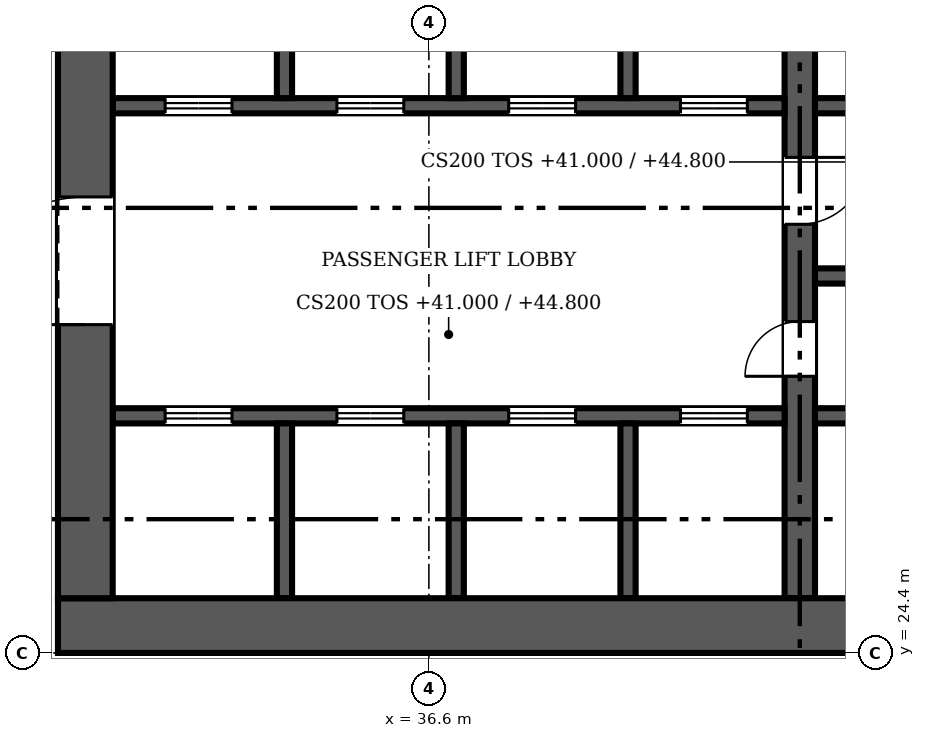
"""IFC4 building model, lengths in metres.
Left out: names, types, materials, properties, quantities, classifications, styles, units other than length and angle.
Written with IfcOpenShell. Run it as: python <this file> out.ifc"""

import sys

from ifc_helpers import new_model, si_unit, direction, frame, frame_2d, origin, place, context, subcontext, project, spatial, rectangle, extrude, source, transform, mapped, element, fill, save


model = new_model("IFC4")
c1 = context("Model", 3, precision=1e-05, world=origin(), true_north=direction((0.0, 1.0)))
c2 = subcontext(c1, "Body", "Model", "MODEL_VIEW")
j1 = project(units=[si_unit("LENGTHUNIT", "METRE"), si_unit("PLANEANGLEUNIT", "RADIAN")], contexts=[c1])
p1 = place(None, origin())
s1 = spatial("IfcSite", under=j1, at=p1, CompositionType="ELEMENT")
p2 = place(p1, origin())
s2 = spatial("IfcBuilding", under=s1, at=p2, CompositionType="ELEMENT")
p3 = place(p2, frame((0.0, 0.0, 41.0)))
s3 = spatial("IfcBuildingStorey", under=s2, at=p3, CompositionType="ELEMENT", Elevation=41.0)
p4 = place(p3, frame((54.9, 24.85, 0.0), z_axis=(0.0, 0.0, 1.0), x_axis=(-1.0, 0.0, 0.0)))
e1 = element("IfcWall", 1, at=p4, inside=s3, PredefinedType="SHEAR", context=c2, shape_type="SweptSolid", body=[
    extrude(rectangle(XDim=24.4, YDim=0.9, at=frame_2d((12.2, 0.0))), origin(), (0.0, 0.0, 1.0), 3.8),
])
m1 = source(origin(), c2, "Body", "SweptSolid", [
    extrude(rectangle(XDim=1.2, YDim=2.1, at=frame_2d((0.6, 1.05))), frame((0.0, 0.46, 0.0), z_axis=(0.0, -1.0, 0.0), x_axis=(1.0, 0.0, 0.0)), (0.0, 0.0, 1.0), 0.92),
])
p5 = place(p4, frame((1.5, 0.0, 0.0)))
e2 = element("IfcOpeningElement", 2, at=p5, cuts=e1, PredefinedType="OPENING", context=c2, shape_type="MappedRepresentation", body=[
    mapped(m1, transform((0.0, 0.0, 0.0), scale=1.0)),
])
p6 = place(p3, frame((30.95, 25.3, 0.0), z_axis=(0.0, 0.0, 1.0), x_axis=(0.0, 1.0, 0.0)))
e3 = element("IfcWall", 3, at=p6, inside=s3, PredefinedType="SHEAR", context=c2, shape_type="SweptSolid", body=[
    extrude(rectangle(XDim=22.6, YDim=0.9, at=frame_2d((11.3, 0.0))), origin(), (0.0, 0.0, 1.0), 3.8),
])
m2 = source(origin(), c2, "Body", "SweptSolid", [
    extrude(rectangle(XDim=2.1, YDim=2.4, at=frame_2d((1.05, 1.2))), frame((0.0, 0.46, 0.0), z_axis=(0.0, -1.0, 0.0), x_axis=(1.0, 0.0, 0.0)), (0.0, 0.0, 1.0), 0.92),
])
p7 = place(p6, frame((4.5, 0.0, 0.0)))
e4 = element("IfcOpeningElement", 4, at=p7, cuts=e3, PredefinedType="OPENING", context=c2, shape_type="MappedRepresentation", body=[
    mapped(m2, transform((0.0, 0.0, 0.0), scale=1.0)),
])
p8 = place(p6, frame((16.0, 0.0, 0.0)))
e5 = element("IfcOpeningElement", 5, at=p8, cuts=e3, PredefinedType="OPENING", context=c2, shape_type="MappedRepresentation", body=[
    mapped(m2, transform((0.0, 0.0, 0.0), scale=1.0)),
])
p9 = place(p3, frame((42.7, 36.35, 0.0), z_axis=(0.0, 0.0, 1.0), x_axis=(0.0, -1.0, 0.0)))
e6 = element("IfcWall", 6, at=p9, inside=s3, PredefinedType="SHEAR", context=c2, shape_type="SweptSolid", body=[
    extrude(rectangle(XDim=11.05, YDim=0.5, at=frame_2d((5.525, 0.0))), origin(), (0.0, 0.0, 1.0), 3.8),
])
m3 = source(origin(), c2, "Body", "SweptSolid", [
    extrude(rectangle(XDim=0.9, YDim=2.1, at=frame_2d((0.45, 1.05))), frame((0.0, 0.26, 0.0), z_axis=(0.0, -1.0, 0.0), x_axis=(1.0, 0.0, 0.0)), (0.0, 0.0, 1.0), 0.52),
])
p10 = place(p9, frame((6.5, 0.0, 0.0)))
e7 = element("IfcOpeningElement", 7, at=p10, cuts=e6, PredefinedType="OPENING", context=c2, shape_type="MappedRepresentation", body=[
    mapped(m3, transform((0.0, 0.0, 0.0), scale=1.0)),
])
m4 = source(origin(), c2, "Body", "SweptSolid", [
    extrude(rectangle(XDim=1.1, YDim=2.1, at=frame_2d((0.55, 1.05))), frame((0.0, 0.26, 0.0), z_axis=(0.0, -1.0, 0.0), x_axis=(1.0, 0.0, 0.0)), (0.0, 0.0, 1.0), 0.52),
])
p11 = place(p9, frame((3.8, 0.0, 0.0)))
e8 = element("IfcOpeningElement", 8, at=p11, cuts=e6, PredefinedType="OPENING", context=c2, shape_type="MappedRepresentation", body=[
    mapped(m4, transform((0.0, 0.0, 0.0), scale=1.0)),
])
p12 = place(p3, frame((42.45, 33.4, 0.0), z_axis=(0.0, 0.0, 1.0), x_axis=(-1.0, 0.0, 0.0)))
e9 = element("IfcWall", 9, at=p12, inside=s3, PredefinedType="SOLIDWALL", context=c2, shape_type="SweptSolid", body=[
    extrude(rectangle(XDim=11.05, YDim=0.25, at=frame_2d((5.525, 0.0))), origin(), (0.0, 0.0, 1.0), 3.8),
])
m5 = source(origin(), c2, "Body", "SweptSolid", [
    extrude(rectangle(XDim=1.1, YDim=2.1, at=frame_2d((0.55, 1.05))), frame((0.0, 0.135, 0.0), z_axis=(0.0, -1.0, 0.0), x_axis=(1.0, 0.0, 0.0)), (0.0, 0.0, 1.0), 0.27),
])
p13 = place(p12, frame((9.087, 0.0, 0.0)))
e10 = element("IfcOpeningElement", 10, at=p13, cuts=e9, PredefinedType="OPENING", context=c2, shape_type="MappedRepresentation", body=[
    mapped(m5, transform((0.0, 0.0, 0.0), scale=1.0)),
])
p14 = place(p12, frame((6.262, 0.0, 0.0)))
e11 = element("IfcOpeningElement", 11, at=p14, cuts=e9, PredefinedType="OPENING", context=c2, shape_type="MappedRepresentation", body=[
    mapped(m5, transform((0.0, 0.0, 0.0), scale=1.0)),
])
p15 = place(p12, frame((3.438, 0.0, 0.0)))
e12 = element("IfcOpeningElement", 12, at=p15, cuts=e9, PredefinedType="OPENING", context=c2, shape_type="MappedRepresentation", body=[
    mapped(m5, transform((0.0, 0.0, 0.0), scale=1.0)),
])
p16 = place(p12, frame((0.613, 0.0, 0.0)))
e13 = element("IfcOpeningElement", 13, at=p16, cuts=e9, PredefinedType="OPENING", context=c2, shape_type="MappedRepresentation", body=[
    mapped(m5, transform((0.0, 0.0, 0.0), scale=1.0)),
])
p17 = place(p3, frame((48.225, 33.4, 0.0), z_axis=(0.0, 0.0, 1.0), x_axis=(-1.0, 0.0, 0.0)))
e14 = element("IfcWall", 14, at=p17, inside=s3, PredefinedType="SOLIDWALL", context=c2, shape_type="SweptSolid", body=[
    extrude(rectangle(XDim=5.275, YDim=0.25, at=frame_2d((2.638, 0.0))), origin(), (0.0, 0.0, 1.0), 3.8),
])
m6 = source(origin(), c2, "Body", "SweptSolid", [
    extrude(rectangle(XDim=1.2, YDim=2.1, at=frame_2d((0.6, 1.05))), frame((0.0, 0.135, 0.0), z_axis=(0.0, -1.0, 0.0), x_axis=(1.0, 0.0, 0.0)), (0.0, 0.0, 1.0), 0.27),
])
p18 = place(p17, frame((3.512, 0.0, 0.0)))
e15 = element("IfcOpeningElement", 15, at=p18, cuts=e14, PredefinedType="OPENING", context=c2, shape_type="MappedRepresentation", body=[
    mapped(m6, transform((0.0, 0.0, 0.0), scale=1.0)),
])
p19 = place(p17, frame((0.688, 0.0, 0.0)))
e16 = element("IfcOpeningElement", 16, at=p19, cuts=e14, PredefinedType="OPENING", context=c2, shape_type="MappedRepresentation", body=[
    mapped(m6, transform((0.0, 0.0, 0.0), scale=1.0)),
])
p20 = place(p3, frame((31.4, 28.3, 0.0), z_axis=(0.0, 0.0, 1.0), x_axis=(1.0, 0.0, 0.0)))
e17 = element("IfcWall", 17, at=p20, inside=s3, PredefinedType="SOLIDWALL", context=c2, shape_type="SweptSolid", body=[
    extrude(rectangle(XDim=11.05, YDim=0.25, at=frame_2d((5.525, 0.0))), origin(), (0.0, 0.0, 1.0), 3.8),
])
p21 = place(p20, frame((0.863, 0.0, 0.0)))
e18 = element("IfcOpeningElement", 18, at=p21, cuts=e17, PredefinedType="OPENING", context=c2, shape_type="MappedRepresentation", body=[
    mapped(m5, transform((0.0, 0.0, 0.0), scale=1.0)),
])
p22 = place(p20, frame((3.688, 0.0, 0.0)))
e19 = element("IfcOpeningElement", 19, at=p22, cuts=e17, PredefinedType="OPENING", context=c2, shape_type="MappedRepresentation", body=[
    mapped(m5, transform((0.0, 0.0, 0.0), scale=1.0)),
])
p23 = place(p20, frame((6.512, 0.0, 0.0)))
e20 = element("IfcOpeningElement", 20, at=p23, cuts=e17, PredefinedType="OPENING", context=c2, shape_type="MappedRepresentation", body=[
    mapped(m5, transform((0.0, 0.0, 0.0), scale=1.0)),
])
p24 = place(p20, frame((9.337, 0.0, 0.0)))
e21 = element("IfcOpeningElement", 21, at=p24, cuts=e17, PredefinedType="OPENING", context=c2, shape_type="MappedRepresentation", body=[
    mapped(m5, transform((0.0, 0.0, 0.0), scale=1.0)),
])
for number, where, z_axis, x_axis in (
    (22, (42.95, 28.3, 0.0), (0.0, 0.0, 1.0), (1.0, 0.0, 0.0)),
    (23, (42.95, 30.6, 0.0), (0.0, 0.0, 1.0), (1.0, 0.0, 0.0)),
):
    element("IfcWall", number, at=place(p3, frame(where, z_axis=z_axis, x_axis=x_axis)), inside=s3, PredefinedType="SOLIDWALL", context=c2, shape_type="SweptSolid", body=[
        extrude(rectangle(XDim=5.275, YDim=0.25, at=frame_2d((2.638, 0.0))), origin(), (0.0, 0.0, 1.0), 3.8),
    ])
for number, where, z_axis, x_axis in (
    (24, (34.225, 33.525, 0.0), (0.0, 0.0, 1.0), (0.0, 1.0, 0.0)),
    (25, (37.05, 33.525, 0.0), (0.0, 0.0, 1.0), (0.0, 1.0, 0.0)),
    (26, (39.875, 33.525, 0.0), (0.0, 0.0, 1.0), (0.0, 1.0, 0.0)),
):
    element("IfcWall", number, at=place(p3, frame(where, z_axis=z_axis, x_axis=x_axis)), inside=s3, PredefinedType="SOLIDWALL", context=c2, shape_type="SweptSolid", body=[
        extrude(rectangle(XDim=2.825, YDim=0.25, at=frame_2d((1.413, 0.0))), origin(), (0.0, 0.0, 1.0), 3.8),
    ])
for number, where, z_axis, x_axis in (
    (27, (34.225, 25.3, 0.0), (0.0, 0.0, 1.0), (0.0, 1.0, 0.0)),
    (28, (37.05, 25.3, 0.0), (0.0, 0.0, 1.0), (0.0, 1.0, 0.0)),
    (29, (39.875, 25.3, 0.0), (0.0, 0.0, 1.0), (0.0, 1.0, 0.0)),
):
    element("IfcWall", number, at=place(p3, frame(where, z_axis=z_axis, x_axis=x_axis)), inside=s3, PredefinedType="SOLIDWALL", context=c2, shape_type="SweptSolid", body=[
        extrude(rectangle(XDim=2.875, YDim=0.25, at=frame_2d((1.438, 0.0))), origin(), (0.0, 0.0, 1.0), 3.8),
    ])
m7 = source(origin(), c2, "Body", "SweptSolid", [
    extrude(rectangle(XDim=2.1, YDim=2.4, at=frame_2d((1.05, 1.2))), frame((0.0, 0.025, 0.0), z_axis=(0.0, -1.0, 0.0), x_axis=(1.0, 0.0, 0.0)), (0.0, 0.0, 1.0), 0.05),
])
p25 = place(p7, origin())
e30 = element("IfcDoor", 30, at=p25, inside=s3, OperationType="DOUBLE_DOOR_SINGLE_SWING", PredefinedType="DOOR", context=c2, shape_type="MappedRepresentation", body=[
    mapped(m7, transform((0.0, 0.0, 0.0), scale=1.0)),
])
fill(e4, e30)
m8 = source(origin(), c2, "Body", "SweptSolid", [
    extrude(rectangle(XDim=0.9, YDim=2.1, at=frame_2d((0.45, 1.05))), frame((0.0, 0.025, 0.0), z_axis=(0.0, -1.0, 0.0), x_axis=(1.0, 0.0, 0.0)), (0.0, 0.0, 1.0), 0.05),
])
p26 = place(p10, origin())
e31 = element("IfcDoor", 31, at=p26, inside=s3, OperationType="SINGLE_SWING_RIGHT", PredefinedType="DOOR", context=c2, shape_type="MappedRepresentation", body=[
    mapped(m8, transform((0.0, 0.0, 0.0), scale=1.0)),
])
fill(e7, e31)
m9 = source(origin(), c2, "Body", "SweptSolid", [
    extrude(rectangle(XDim=1.1, YDim=2.1, at=frame_2d((0.55, 1.05))), frame((0.0, 0.025, 0.0), z_axis=(0.0, -1.0, 0.0), x_axis=(1.0, 0.0, 0.0)), (0.0, 0.0, 1.0), 0.05),
])
p27 = place(p11, origin())
e32 = element("IfcDoor", 32, at=p27, inside=s3, OperationType="SINGLE_SWING_LEFT", PredefinedType="DOOR", context=c2, shape_type="MappedRepresentation", body=[
    mapped(m9, transform((0.0, 0.0, 0.0), scale=1.0)),
])
fill(e8, e32)
p28 = place(p13, origin())
e33 = element("IfcDoor", 33, at=p28, inside=s3, OperationType="DOUBLE_DOOR_SLIDING", PredefinedType="DOOR", context=c2, shape_type="MappedRepresentation", body=[
    mapped(m9, transform((0.0, 0.0, 0.0), scale=1.0)),
])
fill(e10, e33)
p29 = place(p14, origin())
e34 = element("IfcDoor", 34, at=p29, inside=s3, OperationType="DOUBLE_DOOR_SLIDING", PredefinedType="DOOR", context=c2, shape_type="MappedRepresentation", body=[
    mapped(m9, transform((0.0, 0.0, 0.0), scale=1.0)),
])
fill(e11, e34)
p30 = place(p15, origin())
e35 = element("IfcDoor", 35, at=p30, inside=s3, OperationType="DOUBLE_DOOR_SLIDING", PredefinedType="DOOR", context=c2, shape_type="MappedRepresentation", body=[
    mapped(m9, transform((0.0, 0.0, 0.0), scale=1.0)),
])
fill(e12, e35)
p31 = place(p16, origin())
e36 = element("IfcDoor", 36, at=p31, inside=s3, OperationType="DOUBLE_DOOR_SLIDING", PredefinedType="DOOR", context=c2, shape_type="MappedRepresentation", body=[
    mapped(m9, transform((0.0, 0.0, 0.0), scale=1.0)),
])
fill(e13, e36)
p32 = place(p21, origin())
e37 = element("IfcDoor", 37, at=p32, inside=s3, OperationType="DOUBLE_DOOR_SLIDING", PredefinedType="DOOR", context=c2, shape_type="MappedRepresentation", body=[
    mapped(m9, transform((0.0, 0.0, 0.0), scale=1.0)),
])
fill(e18, e37)
p33 = place(p22, origin())
e38 = element("IfcDoor", 38, at=p33, inside=s3, OperationType="DOUBLE_DOOR_SLIDING", PredefinedType="DOOR", context=c2, shape_type="MappedRepresentation", body=[
    mapped(m9, transform((0.0, 0.0, 0.0), scale=1.0)),
])
fill(e19, e38)
p34 = place(p23, origin())
e39 = element("IfcDoor", 39, at=p34, inside=s3, OperationType="DOUBLE_DOOR_SLIDING", PredefinedType="DOOR", context=c2, shape_type="MappedRepresentation", body=[
    mapped(m9, transform((0.0, 0.0, 0.0), scale=1.0)),
])
fill(e20, e39)
p35 = place(p24, origin())
e40 = element("IfcDoor", 40, at=p35, inside=s3, OperationType="DOUBLE_DOOR_SLIDING", PredefinedType="DOOR", context=c2, shape_type="MappedRepresentation", body=[
    mapped(m9, transform((0.0, 0.0, 0.0), scale=1.0)),
])
fill(e21, e40)
save(model, sys.argv[1])
